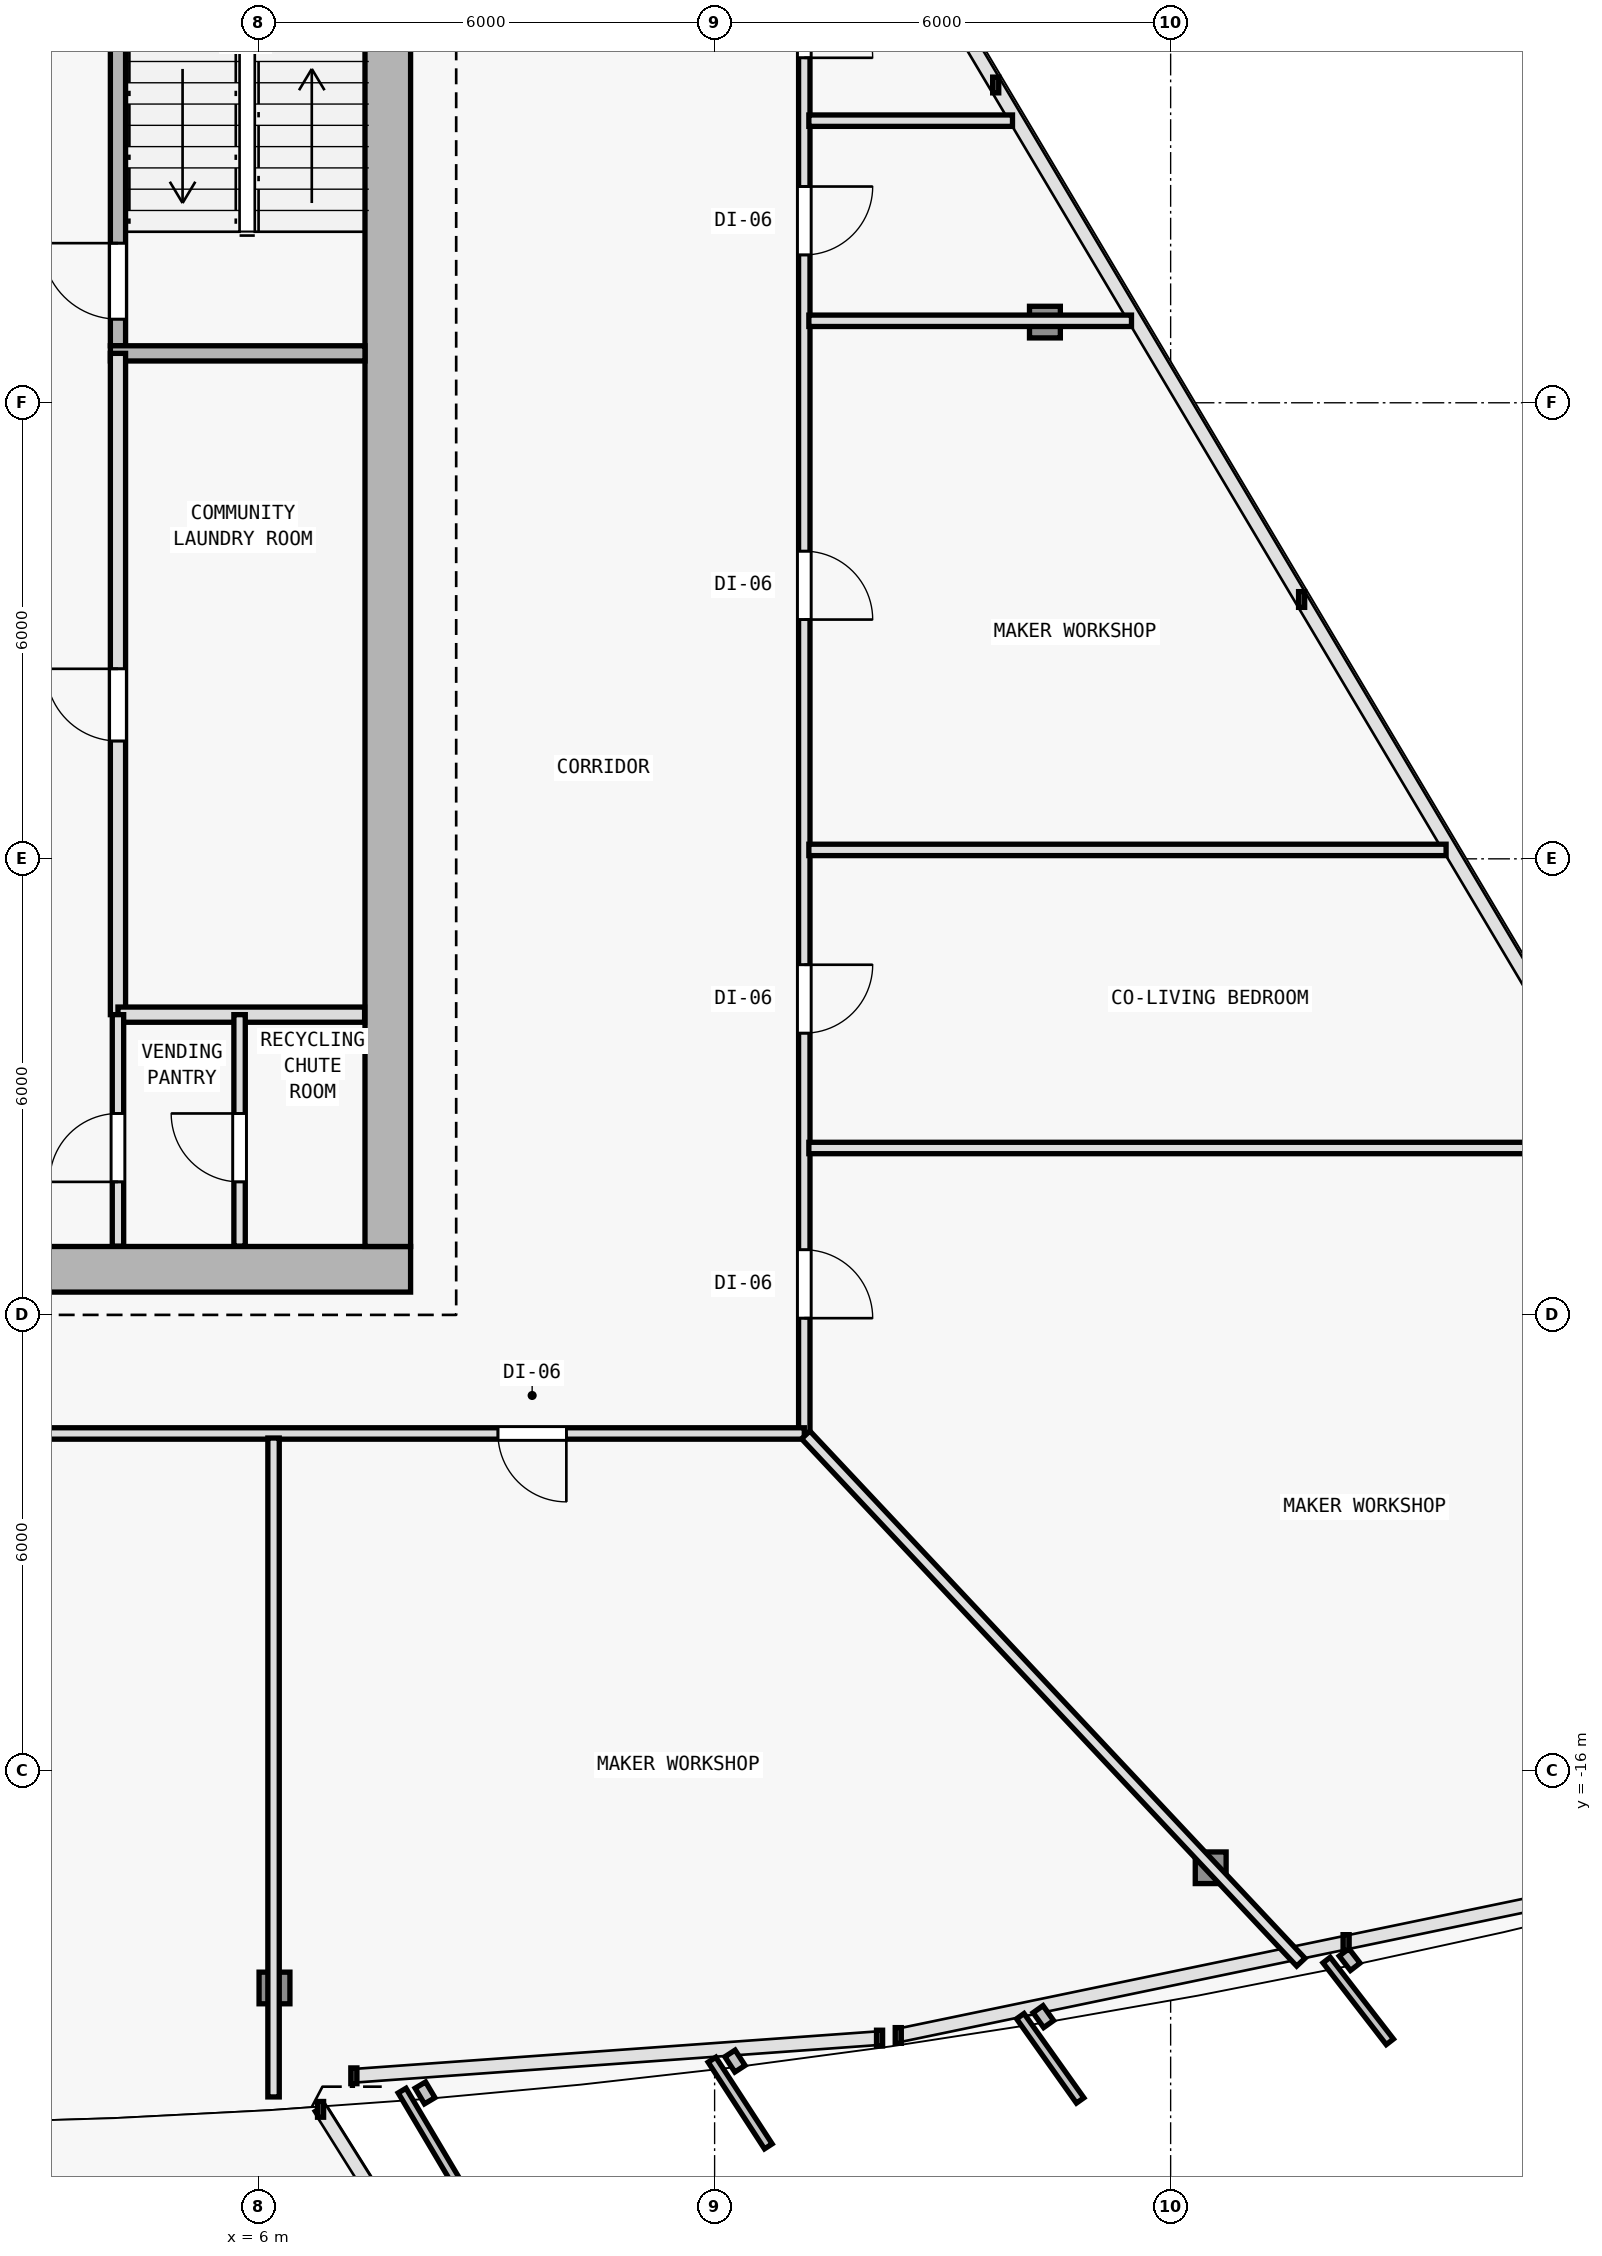
"""IFC4 building model, lengths in metres.
Left out: names, types, materials, properties, quantities, classifications, styles, units other than length and angle.
Written with IfcOpenShell. Run it as: python <this file> out.ifc"""

import sys

from ifc_helpers import new_model, si_unit, direction, frame, frame_2d, origin, origin_2d, place, context, subcontext, project, spatial, rectangle, i_section, extrude, element, fill, save


model = new_model("IFC4")
c1 = context("Model", 3, precision=1e-05, world=origin(), true_north=direction((0.0, 1.0)))
c2 = subcontext(c1, "Body", "Model", "MODEL_VIEW")
j1 = project(units=[si_unit("LENGTHUNIT", "METRE"), si_unit("PLANEANGLEUNIT", "RADIAN")], contexts=[c1])
p1 = place(None, origin())
s1 = spatial("IfcSite", under=j1, at=p1, CompositionType="ELEMENT")
p2 = place(p1, origin())
s2 = spatial("IfcBuilding", under=s1, at=p2, CompositionType="ELEMENT")
p3 = place(p2, frame((0.0, 0.0, 118.5)))
s3 = spatial("IfcBuildingStorey", under=s2, at=p3, CompositionType="ELEMENT", Elevation=118.5)
for number, where, z_axis, x_axis in (
    (1, (7.7, -9.4, 0.0), (0.0, 0.0, 1.0), (1.0, 0.0, 0.0)),
    (2, (7.7, 0.4, 0.0), (0.0, 0.0, 1.0), (1.0, 0.0, 0.0)),
):
    element("IfcColumn", number, at=place(p3, frame(where, z_axis=z_axis, x_axis=x_axis)), inside=s3, PredefinedType="COLUMN", context=c2, shape_type="SweptSolid", body=[
        extrude(i_section(OverallWidth=0.409, OverallDepth=0.425, WebThickness=0.021, FlangeThickness=0.034, FilletRadius=0.015, at=origin_2d()), origin(), (0.0, 0.0, 1.0), 3.6),
    ])
p4 = place(p3, frame((6.209, -18.855, 0.006), z_axis=(-0.006934304776, 0.03521539092, 0.999355688261), x_axis=(-0.981159154887, -0.193201223549, 0.0)))
e3 = element("IfcColumn", 3, at=p4, inside=s3, PredefinedType="COLUMN", context=c2, shape_type="SweptSolid", body=[
    extrude(i_section(OverallWidth=0.406, OverallDepth=0.416, WebThickness=0.019, FlangeThickness=0.031, FilletRadius=0.015, at=origin_2d()), origin(), (0.0, 0.0, 1.0), 3.591),
])
p5 = place(p3, frame((18.527, -17.274, 0.006), z_axis=(-0.020664238418, 0.033511412961, 0.999224686671), x_axis=(-0.851183725565, -0.524867855115, 0.0)))
e4 = element("IfcColumn", 4, at=p5, inside=s3, PredefinedType="COLUMN", context=c2, shape_type="SweptSolid", body=[
    extrude(i_section(OverallWidth=0.406, OverallDepth=0.416, WebThickness=0.019, FlangeThickness=0.031, FilletRadius=0.015, at=origin_2d()), origin(), (0.0, 0.0, 1.0), 3.592),
])
p6 = place(p3, frame((22.863, -7.899, 0.006), z_axis=(-0.026107436898, 0.021620221181, 0.999425318758), x_axis=(-0.637813971185, -0.770190455771, 0.0)))
e5 = element("IfcColumn", 5, at=p6, inside=s3, PredefinedType="COLUMN", context=c2, shape_type="SweptSolid", body=[
    extrude(i_section(OverallWidth=0.406, OverallDepth=0.416, WebThickness=0.019, FlangeThickness=0.031, FilletRadius=0.015, at=origin_2d()), origin(), (0.0, 0.0, 1.0), 3.591),
])
p7 = place(p3, frame((16.346, 3.061, 0.006), z_axis=(-0.018975301738, 0.00958966862, 0.999773962543), x_axis=(-0.451048184688, -0.89249959949, 0.0)))
e6 = element("IfcColumn", 6, at=p7, inside=s3, PredefinedType="COLUMN", context=c2, shape_type="SweptSolid", body=[
    extrude(i_section(OverallWidth=0.406, OverallDepth=0.416, WebThickness=0.019, FlangeThickness=0.031, FilletRadius=0.015, at=origin_2d()), origin(), (0.0, 0.0, 1.0), 3.59),
])
p8 = place(p3, frame((-8.0, -9.4, 0.0), z_axis=(0.0, 0.0, 1.0), x_axis=(1.0, 0.0, 0.0)))
e7 = element("IfcWall", 7, at=p8, inside=s3, PredefinedType="SHEAR", context=c2, shape_type="SweptSolid", body=[
    extrude(rectangle(XDim=16.0, YDim=0.6, at=frame_2d((8.0, 0.0))), origin(), (0.0, 0.0, 1.0), 3.35),
])
p9 = place(p8, frame((9.65, 0.0, 0.0)))
e8 = element("IfcOpeningElement", 8, at=p9, cuts=e7, PredefinedType="OPENING", context=c2, shape_type="SweptSolid", body=[
    extrude(rectangle(XDim=1.5, YDim=2.2, at=frame_2d((0.75, 1.1))), frame((0.0, 0.31, 0.0), z_axis=(0.0, -1.0, 0.0), x_axis=(1.0, 0.0, 0.0)), (0.0, 0.0, 1.0), 0.62),
])
p10 = place(p3, frame((7.7, 9.9, 0.0), z_axis=(0.0, 0.0, 1.0), x_axis=(0.0, -1.0, 0.0)))
e9 = element("IfcWall", 9, at=p10, inside=s3, PredefinedType="SHEAR", context=c2, shape_type="SweptSolid", body=[
    extrude(rectangle(XDim=19.0, YDim=0.6, at=frame_2d((9.5, 0.0))), origin(), (0.0, 0.0, 1.0), 3.35),
])
p11 = place(p3, frame((4.15, 2.75, 0.0), z_axis=(0.0, 0.0, 1.0), x_axis=(0.0, 1.0, 0.0)))
e10 = element("IfcWall", 10, at=p11, inside=s3, PredefinedType="SOLIDWALL", context=c2, shape_type="SweptSolid", body=[
    extrude(rectangle(XDim=7.15, YDim=0.2, at=frame_2d((3.575, 0.0))), origin(), (0.0, 0.0, 1.0), 3.35),
])
p12 = place(p11, frame((0.35, 0.0, 0.0)))
e11 = element("IfcOpeningElement", 11, at=p12, cuts=e10, PredefinedType="OPENING", context=c2, shape_type="SweptSolid", body=[
    extrude(rectangle(XDim=1.0, YDim=2.15, at=frame_2d((0.5, 1.075))), frame((0.0, 0.11, 0.0), z_axis=(0.0, -1.0, 0.0), x_axis=(1.0, 0.0, 0.0)), (0.0, 0.0, 1.0), 0.22),
])
p13 = place(p3, frame((4.05, 2.65, 0.0), z_axis=(0.0, 0.0, 1.0), x_axis=(1.0, 0.0, 0.0)))
e12 = element("IfcWall", 12, at=p13, inside=s3, PredefinedType="SOLIDWALL", context=c2, shape_type="SweptSolid", body=[
    extrude(rectangle(XDim=3.35, YDim=0.2, at=frame_2d((1.675, 0.0))), origin(), (0.0, 0.0, 1.0), 3.35),
])
p14 = place(p3, frame((4.15, -6.05, 0.0), z_axis=(0.0, 0.0, 1.0), x_axis=(0.0, 1.0, 0.0)))
e13 = element("IfcWall", 13, at=p14, inside=s3, PredefinedType="SOLIDWALL", context=c2, shape_type="SweptSolid", body=[
    extrude(rectangle(XDim=8.7, YDim=0.2, at=frame_2d((4.35, 0.0))), origin(), (0.0, 0.0, 1.0), 3.35),
])
p15 = place(p14, frame((3.6, 0.0, 0.0)))
e14 = element("IfcOpeningElement", 14, at=p15, cuts=e13, PredefinedType="OPENING", context=c2, shape_type="SweptSolid", body=[
    extrude(rectangle(XDim=0.95, YDim=2.1, at=frame_2d((0.475, 1.05))), frame((0.0, 0.11, 0.0), z_axis=(0.0, -1.0, 0.0), x_axis=(1.0, 0.0, 0.0)), (0.0, 0.0, 1.0), 0.22),
])
p16 = place(p3, frame((4.15, -6.05, 0.0), z_axis=(0.0, 0.0, 1.0), x_axis=(1.0, 0.0, 0.0)))
e15 = element("IfcWall", 15, at=p16, inside=s3, PredefinedType="SOLIDWALL", context=c2, shape_type="SweptSolid", body=[
    extrude(rectangle(XDim=3.245, YDim=0.2, at=frame_2d((1.623, 0.0))), origin(), (0.0, 0.0, 1.0), 3.35),
])
p17 = place(p3, frame((4.15, -9.095, 0.0), z_axis=(0.0, 0.0, 1.0), x_axis=(0.0, 1.0, 0.0)))
e16 = element("IfcWall", 16, at=p17, inside=s3, PredefinedType="PARTITIONING", context=c2, shape_type="SweptSolid", body=[
    extrude(rectangle(XDim=3.045, YDim=0.15, at=frame_2d((1.522, 0.0))), origin(), (0.0, 0.0, 1.0), 3.35),
])
p18 = place(p17, frame((0.845, 0.0, 0.0)))
e17 = element("IfcOpeningElement", 17, at=p18, cuts=e16, PredefinedType="OPENING", context=c2, shape_type="SweptSolid", body=[
    extrude(rectangle(XDim=0.9, YDim=2.1, at=frame_2d((0.45, 1.05))), frame((0.0, 0.085, 0.0), z_axis=(0.0, -1.0, 0.0), x_axis=(1.0, 0.0, 0.0)), (0.0, 0.0, 1.0), 0.17),
])
p19 = place(p3, frame((5.75, -9.095, 0.0), z_axis=(0.0, 0.0, 1.0), x_axis=(0.0, 1.0, 0.0)))
e18 = element("IfcWall", 18, at=p19, inside=s3, PredefinedType="PARTITIONING", context=c2, shape_type="SweptSolid", body=[
    extrude(rectangle(XDim=3.045, YDim=0.15, at=frame_2d((1.522, 0.0))), origin(), (0.0, 0.0, 1.0), 3.35),
])
p20 = place(p19, frame((0.845, 0.0, 0.0)))
e19 = element("IfcOpeningElement", 19, at=p20, cuts=e18, PredefinedType="OPENING", context=c2, shape_type="SweptSolid", body=[
    extrude(rectangle(XDim=0.9, YDim=2.1, at=frame_2d((0.45, 1.05))), frame((0.0, 0.085, 0.0), z_axis=(0.0, -1.0, 0.0), x_axis=(1.0, 0.0, 0.0)), (0.0, 0.0, 1.0), 0.17),
])
p21 = place(p3, frame((13.18, 8.444, 0.0), z_axis=(0.0, 0.0, 1.0), x_axis=(0.0, -1.0, 0.0)))
e20 = element("IfcWall", 20, at=p21, inside=s3, PredefinedType="PARTITIONING", context=c2, shape_type="SweptSolid", body=[
    extrude(rectangle(XDim=20.004, YDim=0.15, at=frame_2d((10.002, 0.0))), origin(), (0.0, 0.0, 1.0), 2.705),
])
p22 = place(p21, frame((17.587, 0.0, 0.0)))
e21 = element("IfcOpeningElement", 21, at=p22, cuts=e20, PredefinedType="OPENING", context=c2, shape_type="SweptSolid", body=[
    extrude(rectangle(XDim=0.9, YDim=2.1, at=frame_2d((0.45, 1.05))), frame((0.0, 0.085, 0.0), z_axis=(0.0, -1.0, 0.0), x_axis=(1.0, 0.0, 0.0)), (0.0, 0.0, 1.0), 0.17),
])
p23 = place(p21, frame((13.837, 0.0, 0.0)))
e22 = element("IfcOpeningElement", 22, at=p23, cuts=e20, PredefinedType="OPENING", context=c2, shape_type="SweptSolid", body=[
    extrude(rectangle(XDim=0.9, YDim=2.1, at=frame_2d((0.45, 1.05))), frame((0.0, 0.085, 0.0), z_axis=(0.0, -1.0, 0.0), x_axis=(1.0, 0.0, 0.0)), (0.0, 0.0, 1.0), 0.17),
])
p24 = place(p21, frame((8.396, 0.0, 0.0)))
e23 = element("IfcOpeningElement", 23, at=p24, cuts=e20, PredefinedType="OPENING", context=c2, shape_type="SweptSolid", body=[
    extrude(rectangle(XDim=0.9, YDim=2.1, at=frame_2d((0.45, 1.05))), frame((0.0, 0.085, 0.0), z_axis=(0.0, -1.0, 0.0), x_axis=(1.0, 0.0, 0.0)), (0.0, 0.0, 1.0), 0.17),
])
p25 = place(p21, frame((3.599, 0.0, 0.0)))
e24 = element("IfcOpeningElement", 24, at=p25, cuts=e20, PredefinedType="OPENING", context=c2, shape_type="SweptSolid", body=[
    extrude(rectangle(XDim=0.9, YDim=2.1, at=frame_2d((0.45, 1.05))), frame((0.0, 0.085, 0.0), z_axis=(0.0, -1.0, 0.0), x_axis=(1.0, 0.0, 0.0)), (0.0, 0.0, 1.0), 0.17),
])
p26 = place(p21, frame((1.005, 0.0, 0.0)))
e25 = element("IfcOpeningElement", 25, at=p26, cuts=e20, PredefinedType="OPENING", context=c2, shape_type="SweptSolid", body=[
    extrude(rectangle(XDim=0.9, YDim=2.1, at=frame_2d((0.45, 1.05))), frame((0.0, 0.085, 0.0), z_axis=(0.0, -1.0, 0.0), x_axis=(1.0, 0.0, 0.0)), (0.0, 0.0, 1.0), 0.17),
])
p27 = place(p3, frame((13.18, -11.56, 0.0), z_axis=(0.0, 0.0, 1.0), x_axis=(-1.0, 0.0, 0.0)))
e26 = element("IfcWall", 26, at=p27, inside=s3, PredefinedType="PARTITIONING", context=c2, shape_type="SweptSolid", body=[
    extrude(rectangle(XDim=23.04, YDim=0.15, at=frame_2d((11.52, 0.0))), origin(), (0.0, 0.0, 1.0), 2.725),
])
p28 = place(p27, frame((20.669, 0.0, 0.0)))
e27 = element("IfcOpeningElement", 27, at=p28, cuts=e26, PredefinedType="OPENING", context=c2, shape_type="SweptSolid", body=[
    extrude(rectangle(XDim=0.9, YDim=2.1, at=frame_2d((0.45, 1.05))), frame((0.0, 0.085, 0.0), z_axis=(0.0, -1.0, 0.0), x_axis=(1.0, 0.0, 0.0)), (0.0, 0.0, 1.0), 0.17),
])
p29 = place(p27, frame((12.73, 0.0, 0.0)))
e28 = element("IfcOpeningElement", 28, at=p29, cuts=e26, PredefinedType="OPENING", context=c2, shape_type="SweptSolid", body=[
    extrude(rectangle(XDim=0.9, YDim=2.1, at=frame_2d((0.45, 1.05))), frame((0.0, 0.085, 0.0), z_axis=(0.0, -1.0, 0.0), x_axis=(1.0, 0.0, 0.0)), (0.0, 0.0, 1.0), 0.17),
])
p30 = place(p27, frame((3.131, 0.0, 0.0)))
e29 = element("IfcOpeningElement", 29, at=p30, cuts=e26, PredefinedType="OPENING", context=c2, shape_type="SweptSolid", body=[
    extrude(rectangle(XDim=0.9, YDim=2.1, at=frame_2d((0.45, 1.05))), frame((0.0, 0.085, 0.0), z_axis=(0.0, -1.0, 0.0), x_axis=(1.0, 0.0, 0.0)), (0.0, 0.0, 1.0), 0.17),
])
p31 = place(p3, frame((6.197, -11.62, 0.0), z_axis=(0.0, 0.0, 1.0), x_axis=(0.0, -1.0, 0.0)))
e30 = element("IfcWall", 30, at=p31, inside=s3, PredefinedType="PARTITIONING", context=c2, shape_type="SweptSolid", body=[
    extrude(rectangle(XDim=8.668, YDim=0.15, at=frame_2d((4.334, 0.0))), origin(), (0.0, 0.0, 1.0), 2.725),
])
p32 = place(p3, frame((13.199, -11.579, 0.0), z_axis=(0.0, 0.0, 1.0), x_axis=(0.684539988811, -0.728975310774, 0.0)))
e31 = element("IfcWall", 31, at=p32, inside=s3, PredefinedType="PARTITIONING", context=c2, shape_type="SweptSolid", body=[
    extrude(rectangle(XDim=9.516, YDim=0.15, at=frame_2d((4.758, 0.0))), origin(), (0.0, 0.0, 1.0), 2.775),
])
p33 = place(p3, frame((13.24, 3.079, 0.0), z_axis=(0.0, 0.0, 1.0), x_axis=(1.0, 0.0, 0.0)))
e32 = element("IfcWall", 32, at=p33, inside=s3, PredefinedType="PARTITIONING", context=c2, shape_type="SweptSolid", body=[
    extrude(rectangle(XDim=4.245, YDim=0.15, at=frame_2d((2.123, 0.0))), origin(), (0.0, 0.0, 1.0), 2.885),
])
p34 = place(p3, frame((13.24, -3.883, 0.0), z_axis=(0.0, 0.0, 1.0), x_axis=(1.0, 0.0, 0.0)))
e33 = element("IfcWall", 33, at=p34, inside=s3, PredefinedType="PARTITIONING", context=c2, shape_type="SweptSolid", body=[
    extrude(rectangle(XDim=8.384, YDim=0.15, at=frame_2d((4.192, 0.0))), origin(), (0.0, 0.0, 1.0), 2.775),
])
p35 = place(p3, frame((13.24, 5.711, 0.0), z_axis=(0.0, 0.0, 1.0), x_axis=(1.0, 0.0, 0.0)))
e34 = element("IfcWall", 34, at=p35, inside=s3, PredefinedType="PARTITIONING", context=c2, shape_type="SweptSolid", body=[
    extrude(rectangle(XDim=2.679, YDim=0.15, at=frame_2d((1.34, 0.0))), origin(), (0.0, 0.0, 1.0), 2.885),
])
p36 = place(p3, frame((13.24, -7.804, 0.0), z_axis=(0.0, 0.0, 1.0), x_axis=(1.0, 0.0, 0.0)))
e35 = element("IfcWall", 35, at=p36, inside=s3, PredefinedType="PARTITIONING", context=c2, shape_type="SweptSolid", body=[
    extrude(rectangle(XDim=10.716, YDim=0.15, at=frame_2d((5.358, 0.0))), origin(), (0.0, 0.0, 1.0), 2.705),
])
p37 = place(p12, origin())
e36 = element("IfcDoor", 36, at=p37, inside=s3, OperationType="SINGLE_SWING_RIGHT", PredefinedType="DOOR", context=c2, shape_type="SweptSolid", body=[
    extrude(rectangle(XDim=1.0, YDim=2.15, at=frame_2d((0.5, 1.075))), frame((0.0, 0.025, 0.0), z_axis=(0.0, -1.0, 0.0), x_axis=(1.0, 0.0, 0.0)), (0.0, 0.0, 1.0), 0.05),
])
fill(e11, e36)
p38 = place(p15, origin())
e37 = element("IfcDoor", 37, at=p38, inside=s3, OperationType="SINGLE_SWING_RIGHT", PredefinedType="DOOR", context=c2, shape_type="SweptSolid", body=[
    extrude(rectangle(XDim=0.95, YDim=2.1, at=frame_2d((0.475, 1.05))), frame((0.0, 0.025, 0.0), z_axis=(0.0, -1.0, 0.0), x_axis=(1.0, 0.0, 0.0)), (0.0, 0.0, 1.0), 0.05),
])
fill(e14, e37)
p39 = place(p18, origin())
e38 = element("IfcDoor", 38, at=p39, inside=s3, OperationType="SINGLE_SWING_LEFT", PredefinedType="DOOR", context=c2, shape_type="SweptSolid", body=[
    extrude(rectangle(XDim=0.9, YDim=2.1, at=frame_2d((0.45, 1.05))), frame((0.0, 0.025, 0.0), z_axis=(0.0, -1.0, 0.0), x_axis=(1.0, 0.0, 0.0)), (0.0, 0.0, 1.0), 0.05),
])
fill(e17, e38)
p40 = place(p20, origin())
e39 = element("IfcDoor", 39, at=p40, inside=s3, OperationType="SINGLE_SWING_RIGHT", PredefinedType="DOOR", context=c2, shape_type="SweptSolid", body=[
    extrude(rectangle(XDim=0.9, YDim=2.1, at=frame_2d((0.45, 1.05))), frame((0.0, 0.025, 0.0), z_axis=(0.0, -1.0, 0.0), x_axis=(1.0, 0.0, 0.0)), (0.0, 0.0, 1.0), 0.05),
])
fill(e19, e39)
p41 = place(p30, origin())
e40 = element("IfcDoor", 40, at=p41, inside=s3, OperationType="SINGLE_SWING_LEFT", PredefinedType="DOOR", context=c2, shape_type="SweptSolid", body=[
    extrude(rectangle(XDim=0.9, YDim=2.1, at=frame_2d((0.45, 1.05))), frame((0.0, 0.025, 0.0), z_axis=(0.0, -1.0, 0.0), x_axis=(1.0, 0.0, 0.0)), (0.0, 0.0, 1.0), 0.05),
])
fill(e29, e40)
p42 = place(p22, origin())
e41 = element("IfcDoor", 41, at=p42, inside=s3, OperationType="SINGLE_SWING_RIGHT", PredefinedType="DOOR", context=c2, shape_type="SweptSolid", body=[
    extrude(rectangle(XDim=0.9, YDim=2.1, at=frame_2d((0.45, 1.05))), frame((0.0, 0.025, 0.0), z_axis=(0.0, -1.0, 0.0), x_axis=(1.0, 0.0, 0.0)), (0.0, 0.0, 1.0), 0.05),
])
fill(e21, e41)
p43 = place(p23, origin())
e42 = element("IfcDoor", 42, at=p43, inside=s3, OperationType="SINGLE_SWING_LEFT", PredefinedType="DOOR", context=c2, shape_type="SweptSolid", body=[
    extrude(rectangle(XDim=0.9, YDim=2.1, at=frame_2d((0.45, 1.05))), frame((0.0, 0.025, 0.0), z_axis=(0.0, -1.0, 0.0), x_axis=(1.0, 0.0, 0.0)), (0.0, 0.0, 1.0), 0.05),
])
fill(e22, e42)
p44 = place(p24, origin())
e43 = element("IfcDoor", 43, at=p44, inside=s3, OperationType="SINGLE_SWING_RIGHT", PredefinedType="DOOR", context=c2, shape_type="SweptSolid", body=[
    extrude(rectangle(XDim=0.9, YDim=2.1, at=frame_2d((0.45, 1.05))), frame((0.0, 0.025, 0.0), z_axis=(0.0, -1.0, 0.0), x_axis=(1.0, 0.0, 0.0)), (0.0, 0.0, 1.0), 0.05),
])
fill(e23, e43)
p45 = place(p25, origin())
e44 = element("IfcDoor", 44, at=p45, inside=s3, OperationType="SINGLE_SWING_LEFT", PredefinedType="DOOR", context=c2, shape_type="SweptSolid", body=[
    extrude(rectangle(XDim=0.9, YDim=2.1, at=frame_2d((0.45, 1.05))), frame((0.0, 0.025, 0.0), z_axis=(0.0, -1.0, 0.0), x_axis=(1.0, 0.0, 0.0)), (0.0, 0.0, 1.0), 0.05),
])
fill(e24, e44)
p46 = place(p26, origin())
e45 = element("IfcDoor", 45, at=p46, inside=s3, OperationType="SINGLE_SWING_RIGHT", PredefinedType="DOOR", context=c2, shape_type="SweptSolid", body=[
    extrude(rectangle(XDim=0.9, YDim=2.1, at=frame_2d((0.45, 1.05))), frame((0.0, 0.025, 0.0), z_axis=(0.0, -1.0, 0.0), x_axis=(1.0, 0.0, 0.0)), (0.0, 0.0, 1.0), 0.05),
])
fill(e25, e45)
save(model, sys.argv[1])
